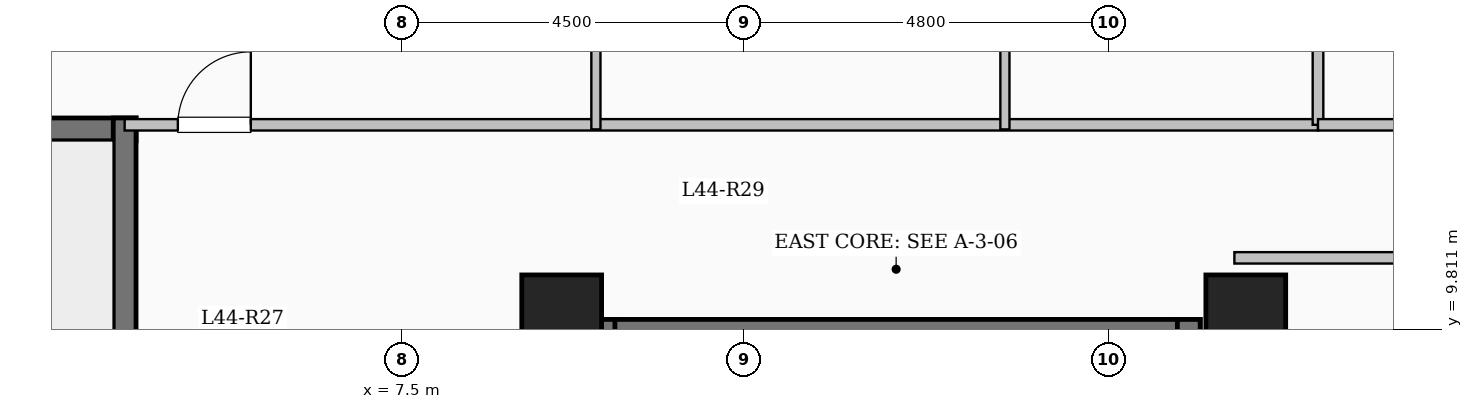
"""IFC4 building model, lengths in metres.
Left out: names, types, materials, properties, quantities, classifications, styles, units other than length and angle.
Written with IfcOpenShell. Run it as: python <this file> out.ifc"""

import sys

from ifc_helpers import new_model, si_unit, direction, frame, frame_2d, origin, origin_2d, place, context, subcontext, project, spatial, rectangle, extrude, element, fill, save


model = new_model("IFC4")
c1 = context("Model", 3, precision=1e-05, world=origin(), true_north=direction((0.0, 1.0)))
c2 = subcontext(c1, "Body", "Model", "MODEL_VIEW")
j1 = project(units=[si_unit("LENGTHUNIT", "METRE"), si_unit("PLANEANGLEUNIT", "RADIAN")], contexts=[c1])
p1 = place(None, origin())
s1 = spatial("IfcSite", under=j1, at=p1, CompositionType="ELEMENT")
p2 = place(p1, origin())
s2 = spatial("IfcBuilding", under=s1, at=p2, CompositionType="ELEMENT")
p3 = place(p2, frame((0.0, 0.0, 162.75)))
s3 = spatial("IfcBuildingStorey", under=s2, at=p3, CompositionType="ELEMENT", Elevation=162.75)
for number, where, z_axis, x_axis in (
    (1, (9.6, 10.0, 0.0), (0.0, 0.0, 1.0), (1.0, 0.0, 0.0)),
    (2, (18.6, 10.0, 0.0), (0.0, 0.0, 1.0), (1.0, 0.0, 0.0)),
):
    element("IfcColumn", number, at=place(p3, frame(where, z_axis=z_axis, x_axis=x_axis)), inside=s3, PredefinedType="COLUMN", context=c2, shape_type="SweptSolid", body=[
        extrude(rectangle(XDim=1.05, YDim=1.05, at=origin_2d()), origin(), (0.0, 0.0, 1.0), 3.35),
    ])
p4 = place(p3, frame((10.0, 9.79, 0.0), z_axis=(0.0, 0.0, 1.0), x_axis=(1.0, 0.0, 0.0)))
e3 = element("IfcWall", 3, at=p4, inside=s3, PredefinedType="SHEAR", context=c2, shape_type="SweptSolid", body=[
    extrude(rectangle(XDim=8.0, YDim=0.3, at=frame_2d((4.0, 0.0))), origin(), (0.0, 0.0, 1.0), 3.35),
])
for number, where, z_axis, x_axis in (
    (4, (10.15, 6.35, 0.0), (0.0, 0.0, 1.0), (0.0, 1.0, 0.0)),
    (5, (17.85, 6.35, 0.0), (0.0, 0.0, 1.0), (0.0, 1.0, 0.0)),
):
    element("IfcWall", number, at=place(p3, frame(where, z_axis=z_axis, x_axis=x_axis)), inside=s3, PredefinedType="SHEAR", context=c2, shape_type="SweptSolid", body=[
        extrude(rectangle(XDim=3.59, YDim=0.3, at=frame_2d((1.795, 0.0))), origin(), (0.0, 0.0, 1.0), 3.35),
    ])
p5 = place(p3, frame((-4.0, 12.44, 0.0), z_axis=(0.0, 0.0, 1.0), x_axis=(1.0, 0.0, 0.0)))
e6 = element("IfcWall", 6, at=p5, inside=s3, PredefinedType="SHEAR", context=c2, shape_type="SweptSolid", body=[
    extrude(rectangle(XDim=8.0, YDim=0.3, at=frame_2d((4.0, 0.0))), origin(), (0.0, 0.0, 1.0), 3.35),
])
p6 = place(p3, frame((3.85, 9.0, 0.0), z_axis=(0.0, 0.0, 1.0), x_axis=(0.0, 1.0, 0.0)))
e7 = element("IfcWall", 7, at=p6, inside=s3, PredefinedType="SHEAR", context=c2, shape_type="SweptSolid", body=[
    extrude(rectangle(XDim=3.59, YDim=0.3, at=frame_2d((1.795, 0.0))), origin(), (0.0, 0.0, 1.0), 3.35),
])
p7 = place(p3, frame((3.85, 12.5, 0.0), z_axis=(0.0, 0.0, 1.0), x_axis=(1.0, 0.0, 0.0)))
e8 = element("IfcWall", 8, at=p7, inside=s3, PredefinedType="PARTITIONING", context=c2, shape_type="SweptSolid", body=[
    extrude(rectangle(XDim=15.7, YDim=0.15, at=frame_2d((7.85, 0.0))), origin(), (0.0, 0.0, 1.0), 3.1),
])
p8 = place(p7, frame((0.7, 0.0, 0.0)))
e9 = element("IfcOpeningElement", 9, at=p8, cuts=e8, PredefinedType="OPENING", context=c2, shape_type="SweptSolid", body=[
    extrude(rectangle(XDim=0.96, YDim=2.15, at=frame_2d((0.48, 1.075))), frame((0.0, 0.085, 0.0), z_axis=(0.0, -1.0, 0.0), x_axis=(1.0, 0.0, 0.0)), (0.0, 0.0, 1.0), 0.17),
])
p9 = place(p3, frame((10.05, 12.44, 0.0), z_axis=(0.0, 0.0, 1.0), x_axis=(0.0, 1.0, 0.0)))
e10 = element("IfcWall", 10, at=p9, inside=s3, PredefinedType="PARTITIONING", context=c2, shape_type="SweptSolid", body=[
    extrude(rectangle(XDim=8.994, YDim=0.12, at=frame_2d((4.497, 0.0))), origin(), (0.0, 0.0, 1.0), 3.1),
])
p10 = place(p9, frame((3.075, 0.0, 0.0)))
e11 = element("IfcOpeningElement", 11, at=p10, cuts=e10, PredefinedType="OPENING", context=c2, shape_type="SweptSolid", body=[
    extrude(rectangle(XDim=1.08, YDim=2.15, at=frame_2d((0.54, 1.075))), frame((0.0, 0.07, 0.0), z_axis=(0.0, -1.0, 0.0), x_axis=(1.0, 0.0, 0.0)), (0.0, 0.0, 1.0), 0.14),
])
p11 = place(p3, frame((15.431, 12.44, 0.0), z_axis=(0.0, 0.0, 1.0), x_axis=(0.0, 1.0, 0.0)))
e12 = element("IfcWall", 12, at=p11, inside=s3, PredefinedType="PARTITIONING", context=c2, shape_type="SweptSolid", body=[
    extrude(rectangle(XDim=2.79, YDim=0.12, at=frame_2d((1.395, 0.0))), origin(), (0.0, 0.0, 1.0), 3.1),
])
p12 = place(p3, frame((18.45, 10.75, 0.0), z_axis=(0.0, 0.0, 1.0), x_axis=(1.0, 0.0, 0.0)))
e13 = element("IfcWall", 13, at=p12, inside=s3, PredefinedType="PARTITIONING", context=c2, shape_type="SweptSolid", body=[
    extrude(rectangle(XDim=6.63, YDim=0.15, at=frame_2d((3.315, 0.0))), origin(), (0.0, 0.0, 1.0), 3.1),
])
p13 = place(p3, frame((19.55, 12.5, 0.0), z_axis=(0.0, 0.0, 1.0), x_axis=(0.0, 1.0, 0.0)))
e14 = element("IfcWall", 14, at=p13, inside=s3, PredefinedType="PARTITIONING", context=c2, shape_type="SweptSolid", body=[
    extrude(rectangle(XDim=4.75, YDim=0.14, at=frame_2d((2.375, 0.0))), origin(), (0.0, 0.0, 1.0), 3.1),
])
p14 = place(p3, frame((19.55, 12.5, 0.0), z_axis=(0.0, 0.0, 1.0), x_axis=(1.0, 0.0, 0.0)))
e15 = element("IfcWall", 15, at=p14, inside=s3, PredefinedType="PARTITIONING", context=c2, shape_type="SweptSolid", body=[
    extrude(rectangle(XDim=5.53, YDim=0.15, at=frame_2d((2.765, 0.0))), origin(), (0.0, 0.0, 1.0), 3.1),
])
p15 = place(p14, frame((2.29, 0.0, 0.0)))
e16 = element("IfcOpeningElement", 16, at=p15, cuts=e15, PredefinedType="OPENING", context=c2, shape_type="SweptSolid", body=[
    extrude(rectangle(XDim=0.95, YDim=2.15, at=frame_2d((0.475, 1.075))), frame((0.0, 0.085, 0.0), z_axis=(0.0, -1.0, 0.0), x_axis=(1.0, 0.0, 0.0)), (0.0, 0.0, 1.0), 0.17),
])
p16 = place(p8, origin())
e17 = element("IfcDoor", 17, at=p16, inside=s3, OperationType="SINGLE_SWING_RIGHT", PredefinedType="DOOR", context=c2, shape_type="SweptSolid", body=[
    extrude(rectangle(XDim=0.96, YDim=2.15, at=frame_2d((0.48, 1.075))), frame((0.0, 0.025, 0.0), z_axis=(0.0, -1.0, 0.0), x_axis=(1.0, 0.0, 0.0)), (0.0, 0.0, 1.0), 0.05),
])
fill(e9, e17)
save(model, sys.argv[1])
